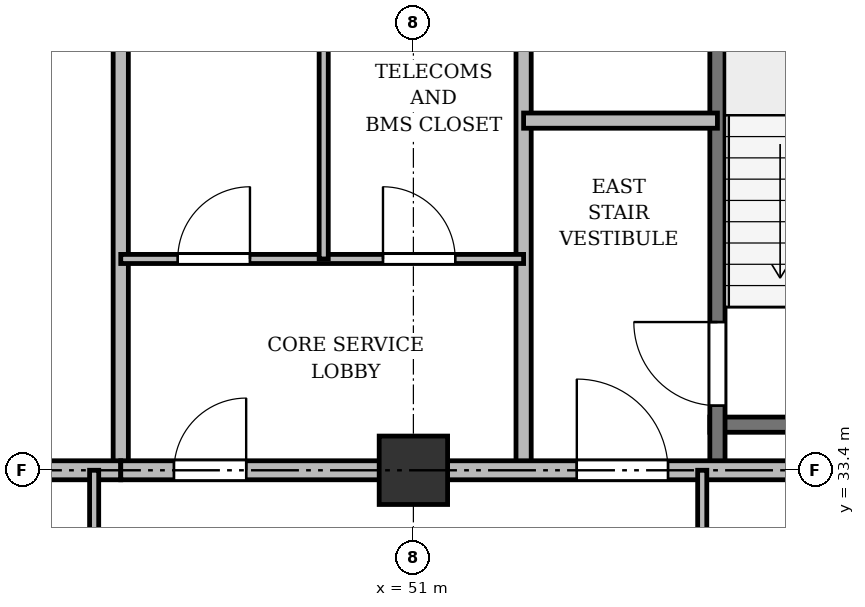
"""IFC4 building model, lengths in metres.
Left out: names, types, materials, properties, quantities, classifications, styles, units other than length and angle.
Written with IfcOpenShell. Run it as: python <this file> out.ifc"""

import sys

from ifc_helpers import new_model, si_unit, direction, frame, frame_2d, origin, origin_2d, place, context, subcontext, project, spatial, rectangle, extrude, source, transform, mapped, element, fill, save


model = new_model("IFC4")
c1 = context("Model", 3, precision=1e-05, world=origin(), true_north=direction((0.0, 1.0)))
c2 = subcontext(c1, "Body", "Model", "MODEL_VIEW")
j1 = project(units=[si_unit("LENGTHUNIT", "METRE"), si_unit("PLANEANGLEUNIT", "RADIAN")], contexts=[c1])
p1 = place(None, origin())
s1 = spatial("IfcSite", under=j1, at=p1, CompositionType="ELEMENT")
p2 = place(p1, origin())
s2 = spatial("IfcBuilding", under=s1, at=p2, CompositionType="ELEMENT")
p3 = place(p2, frame((0.0, 0.0, 48.7)))
s3 = spatial("IfcBuildingStorey", under=s2, at=p3, CompositionType="ELEMENT", Elevation=48.7)
m1 = source(origin(), c2, "Body", "SweptSolid", [
    extrude(rectangle(XDim=0.9, YDim=0.9, at=origin_2d()), origin(), (0.0, 0.0, 1.0), 3.6),
])
p4 = place(p3, frame((51.0, 33.4, 0.0), z_axis=(0.0, 0.0, 1.0), x_axis=(1.0, 0.0, 0.0)))
e1 = element("IfcColumn", 1, at=p4, inside=s3, PredefinedType="COLUMN", context=c2, shape_type="MappedRepresentation", body=[
    mapped(m1, transform((0.0, 0.0, 0.0), x_axis=(1.0, 0.0, 0.0), y_axis=(0.0, 1.0, 0.0), z_axis=(0.0, 0.0, 1.0), scale=1.0)),
])
p5 = place(p3, frame((54.9, 34.0, 0.0), z_axis=(0.0, 0.0, 1.0), x_axis=(1.0, 0.0, 0.0)))
e2 = element("IfcWall", 2, at=p5, inside=s3, PredefinedType="SHEAR", context=c2, shape_type="SweptSolid", body=[
    extrude(rectangle(XDim=3.4, YDim=0.2, at=frame_2d((1.7, 0.0))), origin(), (0.0, 0.0, 1.0), 3.34),
])
p6 = place(p3, frame((55.0, 33.4, 0.0), z_axis=(0.0, 0.0, 1.0), x_axis=(0.0, 1.0, 0.0)))
e3 = element("IfcWall", 3, at=p6, inside=s3, PredefinedType="SHEAR", context=c2, shape_type="SweptSolid", body=[
    extrude(rectangle(XDim=11.1, YDim=0.2, at=frame_2d((5.55, 0.0))), origin(), (0.0, 0.0, 1.0), 3.34),
])
p7 = place(p6, frame((0.85, 0.0, 0.0)))
e4 = element("IfcOpeningElement", 4, at=p7, cuts=e3, PredefinedType="OPENING", context=c2, shape_type="SweptSolid", body=[
    extrude(rectangle(XDim=1.1, YDim=2.15, at=frame_2d((0.55, 1.075))), frame((0.0, 0.11, 0.0), z_axis=(0.0, -1.0, 0.0), x_axis=(1.0, 0.0, 0.0)), (0.0, 0.0, 1.0), 0.22),
])
p8 = place(p3, frame((47.15, 33.4, 0.0), z_axis=(0.0, 0.0, 1.0), x_axis=(0.0, 1.0, 0.0)))
e5 = element("IfcWall", 5, at=p8, inside=s3, PredefinedType="SOLIDWALL", context=c2, shape_type="SweptSolid", body=[
    extrude(rectangle(XDim=11.3, YDim=0.2, at=frame_2d((5.65, 0.0))), origin(), (0.0, 0.0, 1.0), 2.69),
])
p9 = place(p3, frame((26.3, 33.4, 0.0), z_axis=(0.0, 0.0, 1.0), x_axis=(1.0, 0.0, 0.0)))
e6 = element("IfcWall", 6, at=p9, inside=s3, PredefinedType="PARTITIONING", context=c2, shape_type="SweptSolid", body=[
    extrude(rectangle(XDim=20.85, YDim=0.25, at=frame_2d((10.425, 0.0))), origin(), (0.0, 0.0, 1.0), 2.69),
])
p10 = place(p9, frame((9.2, 0.0, 0.0)))
e7 = element("IfcOpeningElement", 7, at=p10, cuts=e6, PredefinedType="OPENING", context=c2, shape_type="SweptSolid", body=[
    extrude(rectangle(XDim=1.6, YDim=2.2, at=frame_2d((0.8, 1.1))), frame((0.0, 0.135, 0.0), z_axis=(0.0, -1.0, 0.0), x_axis=(1.0, 0.0, 0.0)), (0.0, 0.0, 1.0), 0.27),
])
p11 = place(p3, frame((52.45, 33.4, 0.0), z_axis=(0.0, 0.0, 1.0), x_axis=(0.0, 1.0, 0.0)))
e8 = element("IfcWall", 8, at=p11, inside=s3, PredefinedType="PARTITIONING", context=c2, shape_type="SweptSolid", body=[
    extrude(rectangle(XDim=8.65, YDim=0.2, at=frame_2d((4.325, 0.0))), origin(), (0.0, 0.0, 1.0), 2.69),
])
p12 = place(p11, frame((6.2, 0.0, 0.0)))
e9 = element("IfcOpeningElement", 9, at=p12, cuts=e8, PredefinedType="OPENING", context=c2, shape_type="SweptSolid", body=[
    extrude(rectangle(XDim=0.95, YDim=2.15, at=frame_2d((0.475, 1.075))), frame((0.0, 0.11, 0.0), z_axis=(0.0, -1.0, 0.0), x_axis=(1.0, 0.0, 0.0)), (0.0, 0.0, 1.0), 0.22),
])
p13 = place(p3, frame((52.45, 38.0, 0.0), z_axis=(0.0, 0.0, 1.0), x_axis=(1.0, 0.0, 0.0)))
e10 = element("IfcWall", 10, at=p13, inside=s3, PredefinedType="PARTITIONING", context=c2, shape_type="SweptSolid", body=[
    extrude(rectangle(XDim=2.55, YDim=0.2, at=frame_2d((1.275, 0.0))), origin(), (0.0, 0.0, 1.0), 3.34),
])
p14 = place(p3, frame((47.15, 36.18, 0.0), z_axis=(0.0, 0.0, 1.0), x_axis=(1.0, 0.0, 0.0)))
e11 = element("IfcWall", 11, at=p14, inside=s3, PredefinedType="PARTITIONING", context=c2, shape_type="SweptSolid", body=[
    extrude(rectangle(XDim=5.3, YDim=0.12, at=frame_2d((2.65, 0.0))), origin(), (0.0, 0.0, 1.0), 2.752),
])
p15 = place(p14, frame((0.75, 0.0, 0.0)))
e12 = element("IfcOpeningElement", 12, at=p15, cuts=e11, PredefinedType="OPENING", context=c2, shape_type="SweptSolid", body=[
    extrude(rectangle(XDim=0.95, YDim=2.15, at=frame_2d((0.475, 1.075))), frame((0.0, 0.07, 0.0), z_axis=(0.0, -1.0, 0.0), x_axis=(1.0, 0.0, 0.0)), (0.0, 0.0, 1.0), 0.14),
])
p16 = place(p14, frame((3.45, 0.0, 0.0)))
e13 = element("IfcOpeningElement", 13, at=p16, cuts=e11, PredefinedType="OPENING", context=c2, shape_type="SweptSolid", body=[
    extrude(rectangle(XDim=0.95, YDim=2.15, at=frame_2d((0.475, 1.075))), frame((0.0, 0.07, 0.0), z_axis=(0.0, -1.0, 0.0), x_axis=(1.0, 0.0, 0.0)), (0.0, 0.0, 1.0), 0.14),
])
p17 = place(p3, frame((49.82, 36.18, 0.0), z_axis=(0.0, 0.0, 1.0), x_axis=(0.0, 1.0, 0.0)))
e14 = element("IfcWall", 14, at=p17, inside=s3, PredefinedType="PARTITIONING", context=c2, shape_type="SweptSolid", body=[
    extrude(rectangle(XDim=5.82, YDim=0.12, at=frame_2d((2.91, 0.0))), origin(), (0.0, 0.0, 1.0), 3.34),
])
p18 = place(p3, frame((47.15, 33.4, 0.0), z_axis=(0.0, 0.0, 1.0), x_axis=(1.0, 0.0, 0.0)))
e15 = element("IfcWall", 15, at=p18, inside=s3, PredefinedType="PARTITIONING", context=c2, shape_type="SweptSolid", body=[
    extrude(rectangle(XDim=11.15, YDim=0.25, at=frame_2d((5.575, 0.0))), origin(), (0.0, 0.0, 1.0), 2.69),
])
p19 = place(p18, frame((0.7, 0.0, 0.0)))
e16 = element("IfcOpeningElement", 16, at=p19, cuts=e15, PredefinedType="OPENING", context=c2, shape_type="SweptSolid", body=[
    extrude(rectangle(XDim=0.95, YDim=2.15, at=frame_2d((0.475, 1.075))), frame((0.0, 0.135, 0.0), z_axis=(0.0, -1.0, 0.0), x_axis=(1.0, 0.0, 0.0)), (0.0, 0.0, 1.0), 0.27),
])
p20 = place(p18, frame((6.0, 0.0, 0.0)))
e17 = element("IfcOpeningElement", 17, at=p20, cuts=e15, PredefinedType="OPENING", context=c2, shape_type="SweptSolid", body=[
    extrude(rectangle(XDim=1.2, YDim=2.15, at=frame_2d((0.6, 1.075))), frame((0.0, 0.135, 0.0), z_axis=(0.0, -1.0, 0.0), x_axis=(1.0, 0.0, 0.0)), (0.0, 0.0, 1.0), 0.27),
])
for number, where, z_axis, x_axis in (
    (18, (46.8, 29.8, 0.0), (0.0, 0.0, 1.0), (0.0, 1.0, 0.0)),
    (19, (54.8, 29.8, 0.0), (0.0, 0.0, 1.0), (0.0, 1.0, 0.0)),
):
    element("IfcWall", number, at=place(p3, frame(where, z_axis=z_axis, x_axis=x_axis)), inside=s3, PredefinedType="PARTITIONING", context=c2, shape_type="SweptSolid", body=[
        extrude(rectangle(XDim=3.6, YDim=0.12, at=frame_2d((1.8, 0.0))), origin(), (0.0, 0.0, 1.0), 2.69),
    ])
m2 = source(origin(), c2, "Body", "SweptSolid", [
    extrude(rectangle(XDim=1.1, YDim=2.15, at=frame_2d((0.55, 1.075))), frame((0.0, 0.025, 0.0), z_axis=(0.0, -1.0, 0.0), x_axis=(1.0, 0.0, 0.0)), (0.0, 0.0, 1.0), 0.05),
])
p21 = place(p7, origin())
e20 = element("IfcDoor", 20, at=p21, inside=s3, OperationType="SINGLE_SWING_RIGHT", PredefinedType="DOOR", context=c2, shape_type="MappedRepresentation", body=[
    mapped(m2, transform((0.0, 0.0, 0.0), x_axis=(1.0, 0.0, 0.0), y_axis=(0.0, 1.0, 0.0), z_axis=(0.0, 0.0, 1.0), scale=1.0)),
])
fill(e4, e20)
m3 = source(origin(), c2, "Body", "SweptSolid", [
    extrude(rectangle(XDim=0.95, YDim=2.15, at=frame_2d((0.475, 1.075))), frame((0.0, 0.025, 0.0), z_axis=(0.0, -1.0, 0.0), x_axis=(1.0, 0.0, 0.0)), (0.0, 0.0, 1.0), 0.05),
])
p22 = place(p15, origin())
e21 = element("IfcDoor", 21, at=p22, inside=s3, OperationType="SINGLE_SWING_RIGHT", PredefinedType="DOOR", context=c2, shape_type="MappedRepresentation", body=[
    mapped(m3, transform((0.0, 0.0, 0.0), x_axis=(1.0, 0.0, 0.0), y_axis=(0.0, 1.0, 0.0), z_axis=(0.0, 0.0, 1.0), scale=1.0)),
])
fill(e12, e21)
p23 = place(p16, origin())
e22 = element("IfcDoor", 22, at=p23, inside=s3, OperationType="SINGLE_SWING_LEFT", PredefinedType="DOOR", context=c2, shape_type="MappedRepresentation", body=[
    mapped(m3, transform((0.0, 0.0, 0.0), x_axis=(1.0, 0.0, 0.0), y_axis=(0.0, 1.0, 0.0), z_axis=(0.0, 0.0, 1.0), scale=1.0)),
])
fill(e13, e22)
p24 = place(p19, origin())
e23 = element("IfcDoor", 23, at=p24, inside=s3, OperationType="SINGLE_SWING_RIGHT", PredefinedType="DOOR", context=c2, shape_type="MappedRepresentation", body=[
    mapped(m3, transform((0.0, 0.0, 0.0), x_axis=(1.0, 0.0, 0.0), y_axis=(0.0, 1.0, 0.0), z_axis=(0.0, 0.0, 1.0), scale=1.0)),
])
fill(e16, e23)
m4 = source(origin(), c2, "Body", "SweptSolid", [
    extrude(rectangle(XDim=1.2, YDim=2.15, at=frame_2d((0.6, 1.075))), frame((0.0, 0.025, 0.0), z_axis=(0.0, -1.0, 0.0), x_axis=(1.0, 0.0, 0.0)), (0.0, 0.0, 1.0), 0.05),
])
p25 = place(p20, origin())
e24 = element("IfcDoor", 24, at=p25, inside=s3, OperationType="SINGLE_SWING_LEFT", PredefinedType="DOOR", context=c2, shape_type="MappedRepresentation", body=[
    mapped(m4, transform((0.0, 0.0, 0.0), x_axis=(1.0, 0.0, 0.0), y_axis=(0.0, 1.0, 0.0), z_axis=(0.0, 0.0, 1.0), scale=1.0)),
])
fill(e17, e24)
save(model, sys.argv[1])
